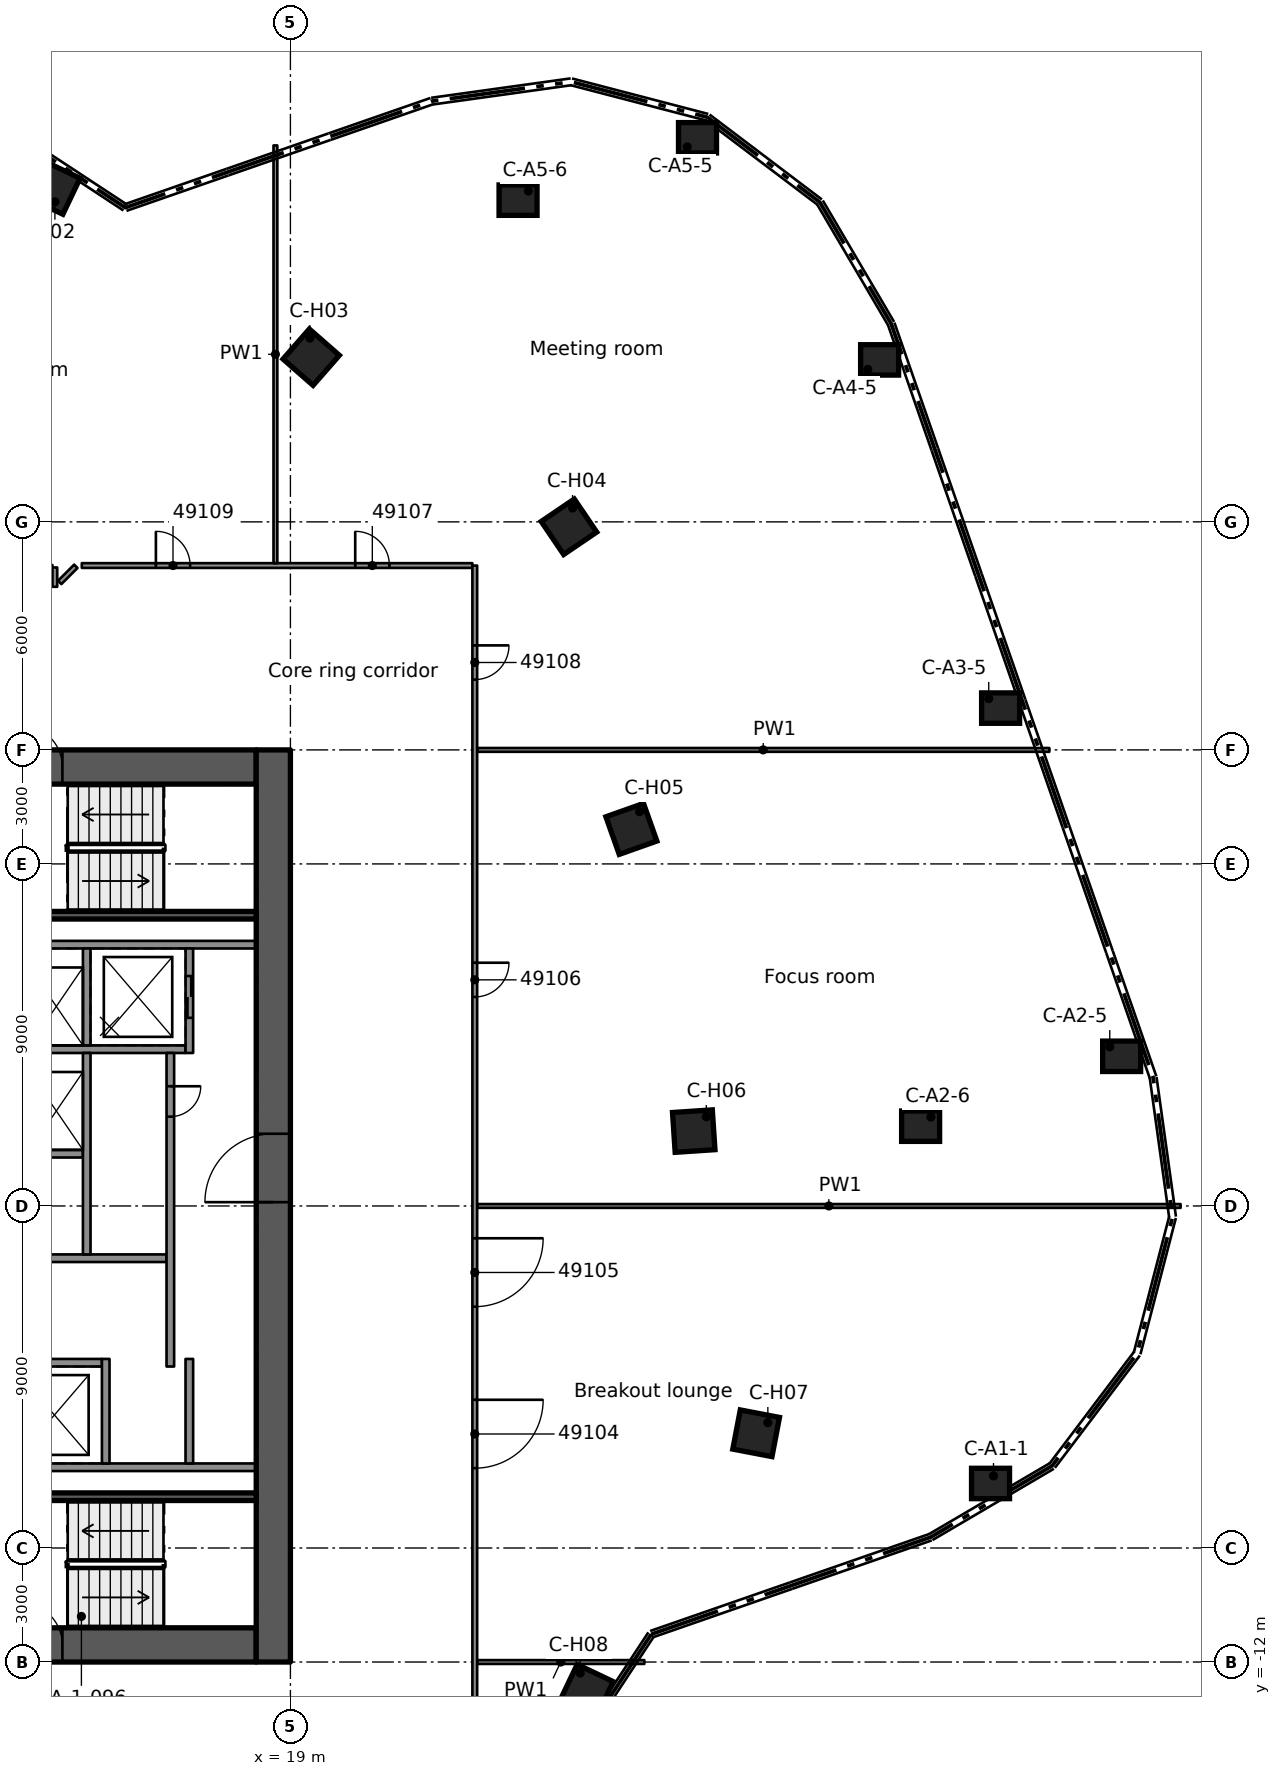
"""IFC4 building model, lengths in metres.
Left out: names, types, materials, properties, quantities, classifications, styles, units other than length and angle.
Written with IfcOpenShell. Run it as: python <this file> out.ifc"""

import sys

from ifc_helpers import new_model, si_unit, direction, frame, frame_2d, origin, origin_2d, place, context, subcontext, project, spatial, rectangle, extrude, element, fill, save


model = new_model("IFC4")
c1 = context("Model", 3, precision=1e-05, world=origin(), true_north=direction((0.0, 1.0)))
c2 = subcontext(c1, "Body", "Model", "MODEL_VIEW")
j1 = project(units=[si_unit("LENGTHUNIT", "METRE"), si_unit("PLANEANGLEUNIT", "RADIAN")], contexts=[c1])
p1 = place(None, origin())
s1 = spatial("IfcSite", under=j1, at=p1, CompositionType="ELEMENT")
p2 = place(p1, origin())
s2 = spatial("IfcBuilding", under=s1, at=p2, CompositionType="ELEMENT")
p3 = place(p2, frame((0.0, 0.0, 246.0)))
s3 = spatial("IfcBuildingStorey", under=s2, at=p3, CompositionType="ELEMENT", Elevation=246.0)
p4 = place(p3, frame((8.9, 11.55, 0.0), z_axis=(0.0, 0.0, 1.0), x_axis=(1.0, 0.0, 0.0)))
e1 = element("IfcWall", 1, at=p4, inside=s3, PredefinedType="SHEAR", context=c2, shape_type="SweptSolid", body=[
    extrude(rectangle(XDim=9.2, YDim=0.9, at=frame_2d((4.6, 0.0))), origin(), (0.0, 0.0, 1.0), 3.5),
])
p5 = place(p4, frame((3.0, 0.0, 0.0)))
e2 = element("IfcOpeningElement", 2, at=p5, cuts=e1, PredefinedType="OPENING", context=c2, shape_type="SweptSolid", body=[
    extrude(rectangle(XDim=1.1, YDim=2.1, at=frame_2d((0.55, 1.05))), frame((0.0, 0.46, 0.0), z_axis=(0.0, -1.0, 0.0), x_axis=(1.0, 0.0, 0.0)), (0.0, 0.0, 1.0), 0.92),
])
p6 = place(p4, frame((0.77, 0.0, 0.0)))
e3 = element("IfcOpeningElement", 3, at=p6, cuts=e1, PredefinedType="OPENING", context=c2, shape_type="SweptSolid", body=[
    extrude(rectangle(XDim=0.9, YDim=2.1, at=frame_2d((0.45, 1.05))), frame((0.0, 0.46, 0.0), z_axis=(0.0, -1.0, 0.0), x_axis=(1.0, 0.0, 0.0)), (0.0, 0.0, 1.0), 0.92),
])
p7 = place(p3, frame((8.9, -11.55, 0.0), z_axis=(0.0, 0.0, 1.0), x_axis=(1.0, 0.0, 0.0)))
e4 = element("IfcWall", 4, at=p7, inside=s3, PredefinedType="SHEAR", context=c2, shape_type="SweptSolid", body=[
    extrude(rectangle(XDim=9.2, YDim=0.9, at=frame_2d((4.6, 0.0))), origin(), (0.0, 0.0, 1.0), 3.5),
])
p8 = place(p7, frame((3.0, 0.0, 0.0)))
e5 = element("IfcOpeningElement", 5, at=p8, cuts=e4, PredefinedType="OPENING", context=c2, shape_type="SweptSolid", body=[
    extrude(rectangle(XDim=1.1, YDim=2.1, at=frame_2d((0.55, 1.05))), frame((0.0, 0.46, 0.0), z_axis=(0.0, -1.0, 0.0), x_axis=(1.0, 0.0, 0.0)), (0.0, 0.0, 1.0), 0.92),
])
p9 = place(p3, frame((18.55, -12.0, 0.0), z_axis=(0.0, 0.0, 1.0), x_axis=(0.0, 1.0, 0.0)))
e6 = element("IfcWall", 6, at=p9, inside=s3, PredefinedType="SHEAR", context=c2, shape_type="SweptSolid", body=[
    extrude(rectangle(XDim=24.0, YDim=0.9, at=frame_2d((12.0, 0.0))), origin(), (0.0, 0.0, 1.0), 3.5),
])
p10 = place(p9, frame((12.1, 0.0, 0.0)))
e7 = element("IfcOpeningElement", 7, at=p10, cuts=e6, PredefinedType="OPENING", context=c2, shape_type="SweptSolid", body=[
    extrude(rectangle(XDim=1.8, YDim=2.1, at=frame_2d((0.9, 1.05))), frame((0.0, 0.46, 0.0), z_axis=(0.0, -1.0, 0.0), x_axis=(1.0, 0.0, 0.0)), (0.0, 0.0, 1.0), 0.92),
])
for number, where, z_axis, x_axis in (
    (8, (37.423, -7.302, 0.0), (0.0, 0.0, 1.0), (1.0, 0.0, 0.0)),
    (9, (40.873, 3.938, 0.0), (0.0, 0.0, 1.0), (1.0, 0.0, 0.0)),
    (10, (35.583, 2.099, 0.0), (0.0, 0.0, 1.0), (1.0, 0.0, 0.0)),
    (11, (37.688, 13.1, 0.0), (0.0, 0.0, 1.0), (1.0, 0.0, 0.0)),
    (12, (34.504, 22.262, 0.0), (0.0, 0.0, 1.0), (1.0, 0.0, 0.0)),
    (13, (29.712, 28.106, 0.0), (0.0, 0.0, 1.0), (1.0, 0.0, 0.0)),
    (14, (24.99, 26.465, 0.0), (0.0, 0.0, 1.0), (1.0, 0.0, 0.0)),
):
    element("IfcColumn", number, at=place(p3, frame(where, z_axis=z_axis, x_axis=x_axis)), inside=s3, PredefinedType="COLUMN", context=c2, shape_type="SweptSolid", body=[
        extrude(rectangle(XDim=1.0, YDim=0.8, at=origin_2d()), origin(), (0.0, 0.0, 1.0), 3.5),
    ])
for number, where, z_axis, x_axis in (
    (15, (12.764, 26.794, 0.0), (0.0, 0.0, 1.0), (0.43, 0.903, 0.0)),
    (16, (19.547, 22.333, 0.0), (0.0, 0.0, 1.0), (0.659, 0.752, 0.0)),
    (17, (26.33, 17.871, 0.0), (0.0, 0.0, 1.0), (0.827, 0.562, 0.0)),
    (18, (27.972, 9.921, 0.0), (0.0, 0.0, 1.0), (0.942, 0.334, 0.0)),
    (19, (29.613, 1.97, 0.0), (0.0, 0.0, 1.0), (0.998, 0.066, 0.0)),
    (20, (31.255, -5.981, 0.0), (0.0, 0.0, 1.0), (0.982, -0.188, 0.0)),
    (21, (26.794, -12.764, 0.0), (0.0, 0.0, 1.0), (0.903, -0.43, 0.0)),
):
    element("IfcColumn", number, at=place(p3, frame(where, z_axis=z_axis, x_axis=x_axis)), inside=s3, PredefinedType="COLUMN", context=c2, shape_type="SweptSolid", body=[
        extrude(rectangle(XDim=1.05, YDim=1.05, at=origin_2d()), origin(), (0.0, 0.0, 1.0), 3.5),
    ])
for number, where, z_axis, x_axis in (
    (22, (11.54, -6.875, 0.0), (0.0, 0.0, 1.0), (1.0, 0.0, 0.0)),
    (23, (11.54, 6.875, 0.0), (0.0, 0.0, 1.0), (1.0, 0.0, 0.0)),
):
    element("IfcWall", number, at=place(p3, frame(where, z_axis=z_axis, x_axis=x_axis)), inside=s3, PredefinedType="SOLIDWALL", context=c2, shape_type="SweptSolid", body=[
        extrude(rectangle(XDim=6.56, YDim=0.2, at=frame_2d((3.28, 0.0))), origin(), (0.0, 0.0, 1.0), 3.08),
    ])
p11 = place(p3, frame((11.54, 4.125, 0.0), z_axis=(0.0, 0.0, 1.0), x_axis=(1.0, 0.0, 0.0)))
e24 = element("IfcWall", 24, at=p11, inside=s3, PredefinedType="SOLIDWALL", context=c2, shape_type="SweptSolid", body=[
    extrude(rectangle(XDim=4.7, YDim=0.2, at=frame_2d((2.35, 0.0))), origin(), (0.0, 0.0, 1.0), 3.08),
])
p12 = place(p3, frame((11.54, 1.375, 0.0), z_axis=(0.0, 0.0, 1.0), x_axis=(1.0, 0.0, 0.0)))
e25 = element("IfcWall", 25, at=p12, inside=s3, PredefinedType="SOLIDWALL", context=c2, shape_type="SweptSolid", body=[
    extrude(rectangle(XDim=2.0, YDim=0.2, at=frame_2d((1.0, 0.0))), origin(), (0.0, 0.0, 1.0), 3.08),
])
p13 = place(p3, frame((11.54, -1.375, 0.0), z_axis=(0.0, 0.0, 1.0), x_axis=(1.0, 0.0, 0.0)))
e26 = element("IfcWall", 26, at=p13, inside=s3, PredefinedType="SOLIDWALL", context=c2, shape_type="SweptSolid", body=[
    extrude(rectangle(XDim=4.2, YDim=0.2, at=frame_2d((2.1, 0.0))), origin(), (0.0, 0.0, 1.0), 3.08),
])
p14 = place(p3, frame((11.54, -4.125, 0.0), z_axis=(0.0, 0.0, 1.0), x_axis=(1.0, 0.0, 0.0)))
e27 = element("IfcWall", 27, at=p14, inside=s3, PredefinedType="SOLIDWALL", context=c2, shape_type="SweptSolid", body=[
    extrude(rectangle(XDim=2.5, YDim=0.2, at=frame_2d((1.25, 0.0))), origin(), (0.0, 0.0, 1.0), 3.08),
])
p15 = place(p3, frame((13.64, 6.775, 0.0), z_axis=(0.0, 0.0, 1.0), x_axis=(0.0, -1.0, 0.0)))
e28 = element("IfcWall", 28, at=p15, inside=s3, PredefinedType="SOLIDWALL", context=c2, shape_type="SweptSolid", body=[
    extrude(rectangle(XDim=2.55, YDim=0.2, at=frame_2d((1.275, 0.0))), origin(), (0.0, 0.0, 1.0), 3.08),
])
p16 = place(p3, frame((13.64, 4.025, 0.0), z_axis=(0.0, 0.0, 1.0), x_axis=(0.0, -1.0, 0.0)))
e29 = element("IfcWall", 29, at=p16, inside=s3, PredefinedType="SOLIDWALL", context=c2, shape_type="SweptSolid", body=[
    extrude(rectangle(XDim=5.3, YDim=0.2, at=frame_2d((2.65, 0.0))), origin(), (0.0, 0.0, 1.0), 3.08),
])
p17 = place(p3, frame((14.14, -4.025, 0.0), z_axis=(0.0, 0.0, 1.0), x_axis=(0.0, -1.0, 0.0)))
e30 = element("IfcWall", 30, at=p17, inside=s3, PredefinedType="SOLIDWALL", context=c2, shape_type="SweptSolid", body=[
    extrude(rectangle(XDim=2.75, YDim=0.2, at=frame_2d((1.375, 0.0))), origin(), (0.0, 0.0, 1.0), 3.08),
])
p18 = place(p3, frame((16.34, 6.775, 0.0), z_axis=(0.0, 0.0, 1.0), x_axis=(0.0, -1.0, 0.0)))
e31 = element("IfcWall", 31, at=p18, inside=s3, PredefinedType="SOLIDWALL", context=c2, shape_type="SweptSolid", body=[
    extrude(rectangle(XDim=2.75, YDim=0.2, at=frame_2d((1.375, 0.0))), origin(), (0.0, 0.0, 1.0), 3.08),
])
p19 = place(p18, frame((0.725, 0.0, 0.0)))
e32 = element("IfcOpeningElement", 32, at=p19, cuts=e31, PredefinedType="OPENING", context=c2, shape_type="SweptSolid", body=[
    extrude(rectangle(XDim=1.1, YDim=2.1, at=frame_2d((0.55, 1.05))), frame((0.0, 0.11, 0.0), z_axis=(0.0, -1.0, 0.0), x_axis=(1.0, 0.0, 0.0)), (0.0, 0.0, 1.0), 0.22),
])
p20 = place(p3, frame((15.84, 4.025, 0.0), z_axis=(0.0, 0.0, 1.0), x_axis=(0.0, -1.0, 0.0)))
e33 = element("IfcWall", 33, at=p20, inside=s3, PredefinedType="SOLIDWALL", context=c2, shape_type="SweptSolid", body=[
    extrude(rectangle(XDim=8.25, YDim=0.2, at=frame_2d((4.125, 0.0))), origin(), (0.0, 0.0, 1.0), 3.08),
])
p21 = place(p20, frame((0.875, 0.0, 0.0)))
e34 = element("IfcOpeningElement", 34, at=p21, cuts=e33, PredefinedType="OPENING", context=c2, shape_type="SweptSolid", body=[
    extrude(rectangle(XDim=0.8, YDim=2.1, at=frame_2d((0.4, 1.05))), frame((0.0, 0.11, 0.0), z_axis=(0.0, -1.0, 0.0), x_axis=(1.0, 0.0, 0.0)), (0.0, 0.0, 1.0), 0.22),
])
p22 = place(p3, frame((16.34, -4.025, 0.0), z_axis=(0.0, 0.0, 1.0), x_axis=(0.0, -1.0, 0.0)))
e35 = element("IfcWall", 35, at=p22, inside=s3, PredefinedType="SOLIDWALL", context=c2, shape_type="SweptSolid", body=[
    extrude(rectangle(XDim=2.75, YDim=0.2, at=frame_2d((1.375, 0.0))), origin(), (0.0, 0.0, 1.0), 3.08),
])
for number, where, z_axis, x_axis in (
    (36, (11.54, -7.65, 0.0), (0.0, 0.0, 1.0), (1.0, 0.0, 0.0)),
    (37, (11.54, 7.65, 0.0), (0.0, 0.0, 1.0), (1.0, 0.0, 0.0)),
):
    element("IfcWall", number, at=place(p3, frame(where, z_axis=z_axis, x_axis=x_axis)), inside=s3, PredefinedType="SOLIDWALL", context=c2, shape_type="SweptSolid", body=[
        extrude(rectangle(XDim=6.56, YDim=0.2, at=frame_2d((3.28, 0.0))), origin(), (0.0, 0.0, 1.0), 3.08),
    ])
p23 = place(p3, frame((23.913, -12.0, 0.0), z_axis=(0.0, 0.0, 1.0), x_axis=(1.0, 0.0, 0.0)))
e38 = element("IfcWall", 38, at=p23, inside=s3, PredefinedType="PARTITIONING", context=c2, shape_type="SweptSolid", body=[
    extrude(rectangle(XDim=4.4, YDim=0.1, at=frame_2d((2.2, 0.0))), origin(), (0.0, 0.0, 1.0), 3.06),
])
p24 = place(p3, frame((23.913, 0.0, 0.0), z_axis=(0.0, 0.0, 1.0), x_axis=(1.0, 0.0, 0.0)))
e39 = element("IfcWall", 39, at=p24, inside=s3, PredefinedType="PARTITIONING", context=c2, shape_type="SweptSolid", body=[
    extrude(rectangle(XDim=18.511, YDim=0.1, at=frame_2d((9.255, 0.0))), origin(), (0.0, 0.0, 1.0), 3.06),
])
p25 = place(p3, frame((23.913, 12.0, 0.0), z_axis=(0.0, 0.0, 1.0), x_axis=(1.0, 0.0, 0.0)))
e40 = element("IfcWall", 40, at=p25, inside=s3, PredefinedType="PARTITIONING", context=c2, shape_type="SweptSolid", body=[
    extrude(rectangle(XDim=15.057, YDim=0.1, at=frame_2d((7.528, 0.0))), origin(), (0.0, 0.0, 1.0), 3.06),
])
p26 = place(p3, frame((13.511, 16.851, 0.0), z_axis=(0.0, 0.0, 1.0), x_axis=(1.0, 0.0, 0.0)))
e41 = element("IfcWall", 41, at=p26, inside=s3, PredefinedType="PARTITIONING", context=c2, shape_type="SweptSolid", body=[
    extrude(rectangle(XDim=10.276, YDim=0.125, at=frame_2d((5.138, 0.0))), origin(), (0.0, 0.0, 1.0), 3.06),
])
p27 = place(p26, frame((7.194, 0.0, 0.0)))
e42 = element("IfcOpeningElement", 42, at=p27, cuts=e41, PredefinedType="OPENING", context=c2, shape_type="SweptSolid", body=[
    extrude(rectangle(XDim=0.9, YDim=2.1, at=frame_2d((0.45, 1.05))), frame((0.0, 0.073, 0.0), z_axis=(0.0, -1.0, 0.0), x_axis=(1.0, 0.0, 0.0)), (0.0, 0.0, 1.0), 0.145),
])
p28 = place(p26, frame((1.949, 0.0, 0.0)))
e43 = element("IfcOpeningElement", 43, at=p28, cuts=e41, PredefinedType="OPENING", context=c2, shape_type="SweptSolid", body=[
    extrude(rectangle(XDim=0.9, YDim=2.1, at=frame_2d((0.45, 1.05))), frame((0.0, 0.073, 0.0), z_axis=(0.0, -1.0, 0.0), x_axis=(1.0, 0.0, 0.0)), (0.0, 0.0, 1.0), 0.145),
])
p29 = place(p3, frame((12.929, 16.407, 0.0), z_axis=(0.0, 0.0, 1.0), x_axis=(0.707106781187, 0.707106781187, 0.0)))
e44 = element("IfcWall", 44, at=p29, inside=s3, PredefinedType="PARTITIONING", context=c2, shape_type="SweptSolid", body=[
    extrude(rectangle(XDim=0.6, YDim=0.125, at=frame_2d((0.3, 0.0))), origin(), (0.0, 0.0, 1.0), 3.06),
])
p30 = place(p3, frame((23.851, 16.85, 0.0), z_axis=(0.0, 0.0, 1.0), x_axis=(0.0, -1.0, 0.0)))
e45 = element("IfcWall", 45, at=p30, inside=s3, PredefinedType="PARTITIONING", context=c2, shape_type="SweptSolid", body=[
    extrude(rectangle(XDim=33.7, YDim=0.125, at=frame_2d((16.85, 0.0))), origin(), (0.0, 0.0, 1.0), 3.06),
])
p31 = place(p30, frame((21.95, 0.0, 0.0)))
e46 = element("IfcOpeningElement", 46, at=p31, cuts=e45, PredefinedType="OPENING", context=c2, shape_type="SweptSolid", body=[
    extrude(rectangle(XDim=1.8, YDim=2.1, at=frame_2d((0.9, 1.05))), frame((0.0, 0.073, 0.0), z_axis=(0.0, -1.0, 0.0), x_axis=(1.0, 0.0, 0.0)), (0.0, 0.0, 1.0), 0.145),
])
p32 = place(p30, frame((17.7, 0.0, 0.0)))
e47 = element("IfcOpeningElement", 47, at=p32, cuts=e45, PredefinedType="OPENING", context=c2, shape_type="SweptSolid", body=[
    extrude(rectangle(XDim=1.8, YDim=2.1, at=frame_2d((0.9, 1.05))), frame((0.0, 0.073, 0.0), z_axis=(0.0, -1.0, 0.0), x_axis=(1.0, 0.0, 0.0)), (0.0, 0.0, 1.0), 0.145),
])
p33 = place(p30, frame((10.45, 0.0, 0.0)))
e48 = element("IfcOpeningElement", 48, at=p33, cuts=e45, PredefinedType="OPENING", context=c2, shape_type="SweptSolid", body=[
    extrude(rectangle(XDim=0.9, YDim=2.1, at=frame_2d((0.45, 1.05))), frame((0.0, 0.073, 0.0), z_axis=(0.0, -1.0, 0.0), x_axis=(1.0, 0.0, 0.0)), (0.0, 0.0, 1.0), 0.145),
])
p34 = place(p30, frame((2.1, 0.0, 0.0)))
e49 = element("IfcOpeningElement", 49, at=p34, cuts=e45, PredefinedType="OPENING", context=c2, shape_type="SweptSolid", body=[
    extrude(rectangle(XDim=0.9, YDim=2.1, at=frame_2d((0.45, 1.05))), frame((0.0, 0.073, 0.0), z_axis=(0.0, -1.0, 0.0), x_axis=(1.0, 0.0, 0.0)), (0.0, 0.0, 1.0), 0.145),
])
p35 = place(p3, frame((18.605, 16.913, 0.0), z_axis=(0.0, 0.0, 1.0), x_axis=(0.0, 1.0, 0.0)))
e50 = element("IfcWall", 50, at=p35, inside=s3, PredefinedType="PARTITIONING", context=c2, shape_type="SweptSolid", body=[
    extrude(rectangle(XDim=10.992, YDim=0.1, at=frame_2d((5.496, 0.0))), origin(), (0.0, 0.0, 1.0), 3.06),
])
p36 = place(p3, frame((12.801, 16.292, 0.0), z_axis=(0.0, 0.0, 1.0), x_axis=(0.0, 1.0, 0.0)))
e51 = element("IfcWall", 51, at=p36, inside=s3, PredefinedType="PARTITIONING", context=c2, shape_type="SweptSolid", body=[
    extrude(rectangle(XDim=0.508, YDim=0.125, at=frame_2d((0.254, 0.0))), origin(), (0.0, 0.0, 1.0), 3.06),
])
p37 = place(p19, origin())
e52 = element("IfcDoor", 52, at=p37, inside=s3, OperationType="DOUBLE_DOOR_SLIDING", PredefinedType="DOOR", context=c2, shape_type="SweptSolid", body=[
    extrude(rectangle(XDim=1.1, YDim=2.1, at=frame_2d((0.55, 1.05))), frame((0.0, 0.025, 0.0), z_axis=(0.0, -1.0, 0.0), x_axis=(1.0, 0.0, 0.0)), (0.0, 0.0, 1.0), 0.05),
])
fill(e32, e52)
p38 = place(p21, origin())
e53 = element("IfcDoor", 53, at=p38, inside=s3, OperationType="SINGLE_SWING_LEFT", PredefinedType="DOOR", context=c2, shape_type="SweptSolid", body=[
    extrude(rectangle(XDim=0.8, YDim=2.1, at=frame_2d((0.4, 1.05))), frame((0.0, 0.025, 0.0), z_axis=(0.0, -1.0, 0.0), x_axis=(1.0, 0.0, 0.0)), (0.0, 0.0, 1.0), 0.05),
])
fill(e34, e53)
p39 = place(p10, origin())
e54 = element("IfcDoor", 54, at=p39, inside=s3, OperationType="SINGLE_SWING_RIGHT", PredefinedType="DOOR", context=c2, shape_type="SweptSolid", body=[
    extrude(rectangle(XDim=1.8, YDim=2.1, at=frame_2d((0.9, 1.05))), frame((0.0, 0.025, 0.0), z_axis=(0.0, -1.0, 0.0), x_axis=(1.0, 0.0, 0.0)), (0.0, 0.0, 1.0), 0.05),
])
fill(e7, e54)
p40 = place(p8, origin())
e55 = element("IfcDoor", 55, at=p40, inside=s3, OperationType="SINGLE_SWING_LEFT", PredefinedType="DOOR", context=c2, shape_type="SweptSolid", body=[
    extrude(rectangle(XDim=1.1, YDim=2.1, at=frame_2d((0.55, 1.05))), frame((0.0, 0.025, 0.0), z_axis=(0.0, -1.0, 0.0), x_axis=(1.0, 0.0, 0.0)), (0.0, 0.0, 1.0), 0.05),
])
fill(e5, e55)
p41 = place(p5, origin())
e56 = element("IfcDoor", 56, at=p41, inside=s3, OperationType="SINGLE_SWING_LEFT", PredefinedType="DOOR", context=c2, shape_type="SweptSolid", body=[
    extrude(rectangle(XDim=1.1, YDim=2.1, at=frame_2d((0.55, 1.05))), frame((0.0, 0.025, 0.0), z_axis=(0.0, -1.0, 0.0), x_axis=(1.0, 0.0, 0.0)), (0.0, 0.0, 1.0), 0.05),
])
fill(e2, e56)
p42 = place(p31, origin())
e57 = element("IfcDoor", 57, at=p42, inside=s3, OperationType="DOUBLE_DOOR_SINGLE_SWING", PredefinedType="DOOR", context=c2, shape_type="SweptSolid", body=[
    extrude(rectangle(XDim=1.8, YDim=2.1, at=frame_2d((0.9, 1.05))), frame((0.0, 0.025, 0.0), z_axis=(0.0, -1.0, 0.0), x_axis=(1.0, 0.0, 0.0)), (0.0, 0.0, 1.0), 0.05),
])
fill(e46, e57)
p43 = place(p32, origin())
e58 = element("IfcDoor", 58, at=p43, inside=s3, OperationType="DOUBLE_DOOR_SINGLE_SWING", PredefinedType="DOOR", context=c2, shape_type="SweptSolid", body=[
    extrude(rectangle(XDim=1.8, YDim=2.1, at=frame_2d((0.9, 1.05))), frame((0.0, 0.025, 0.0), z_axis=(0.0, -1.0, 0.0), x_axis=(1.0, 0.0, 0.0)), (0.0, 0.0, 1.0), 0.05),
])
fill(e47, e58)
p44 = place(p33, origin())
e59 = element("IfcDoor", 59, at=p44, inside=s3, OperationType="SINGLE_SWING_LEFT", PredefinedType="DOOR", context=c2, shape_type="SweptSolid", body=[
    extrude(rectangle(XDim=0.9, YDim=2.1, at=frame_2d((0.45, 1.05))), frame((0.0, 0.025, 0.0), z_axis=(0.0, -1.0, 0.0), x_axis=(1.0, 0.0, 0.0)), (0.0, 0.0, 1.0), 0.05),
])
fill(e48, e59)
p45 = place(p27, origin())
e60 = element("IfcDoor", 60, at=p45, inside=s3, OperationType="SINGLE_SWING_RIGHT", PredefinedType="DOOR", context=c2, shape_type="SweptSolid", body=[
    extrude(rectangle(XDim=0.9, YDim=2.1, at=frame_2d((0.45, 1.05))), frame((0.0, 0.025, 0.0), z_axis=(0.0, -1.0, 0.0), x_axis=(1.0, 0.0, 0.0)), (0.0, 0.0, 1.0), 0.05),
])
fill(e42, e60)
p46 = place(p34, origin())
e61 = element("IfcDoor", 61, at=p46, inside=s3, OperationType="SINGLE_SWING_LEFT", PredefinedType="DOOR", context=c2, shape_type="SweptSolid", body=[
    extrude(rectangle(XDim=0.9, YDim=2.1, at=frame_2d((0.45, 1.05))), frame((0.0, 0.025, 0.0), z_axis=(0.0, -1.0, 0.0), x_axis=(1.0, 0.0, 0.0)), (0.0, 0.0, 1.0), 0.05),
])
fill(e49, e61)
p47 = place(p28, origin())
e62 = element("IfcDoor", 62, at=p47, inside=s3, OperationType="SINGLE_SWING_LEFT", PredefinedType="DOOR", context=c2, shape_type="SweptSolid", body=[
    extrude(rectangle(XDim=0.9, YDim=2.1, at=frame_2d((0.45, 1.05))), frame((0.0, 0.025, 0.0), z_axis=(0.0, -1.0, 0.0), x_axis=(1.0, 0.0, 0.0)), (0.0, 0.0, 1.0), 0.05),
])
fill(e43, e62)
save(model, sys.argv[1])
